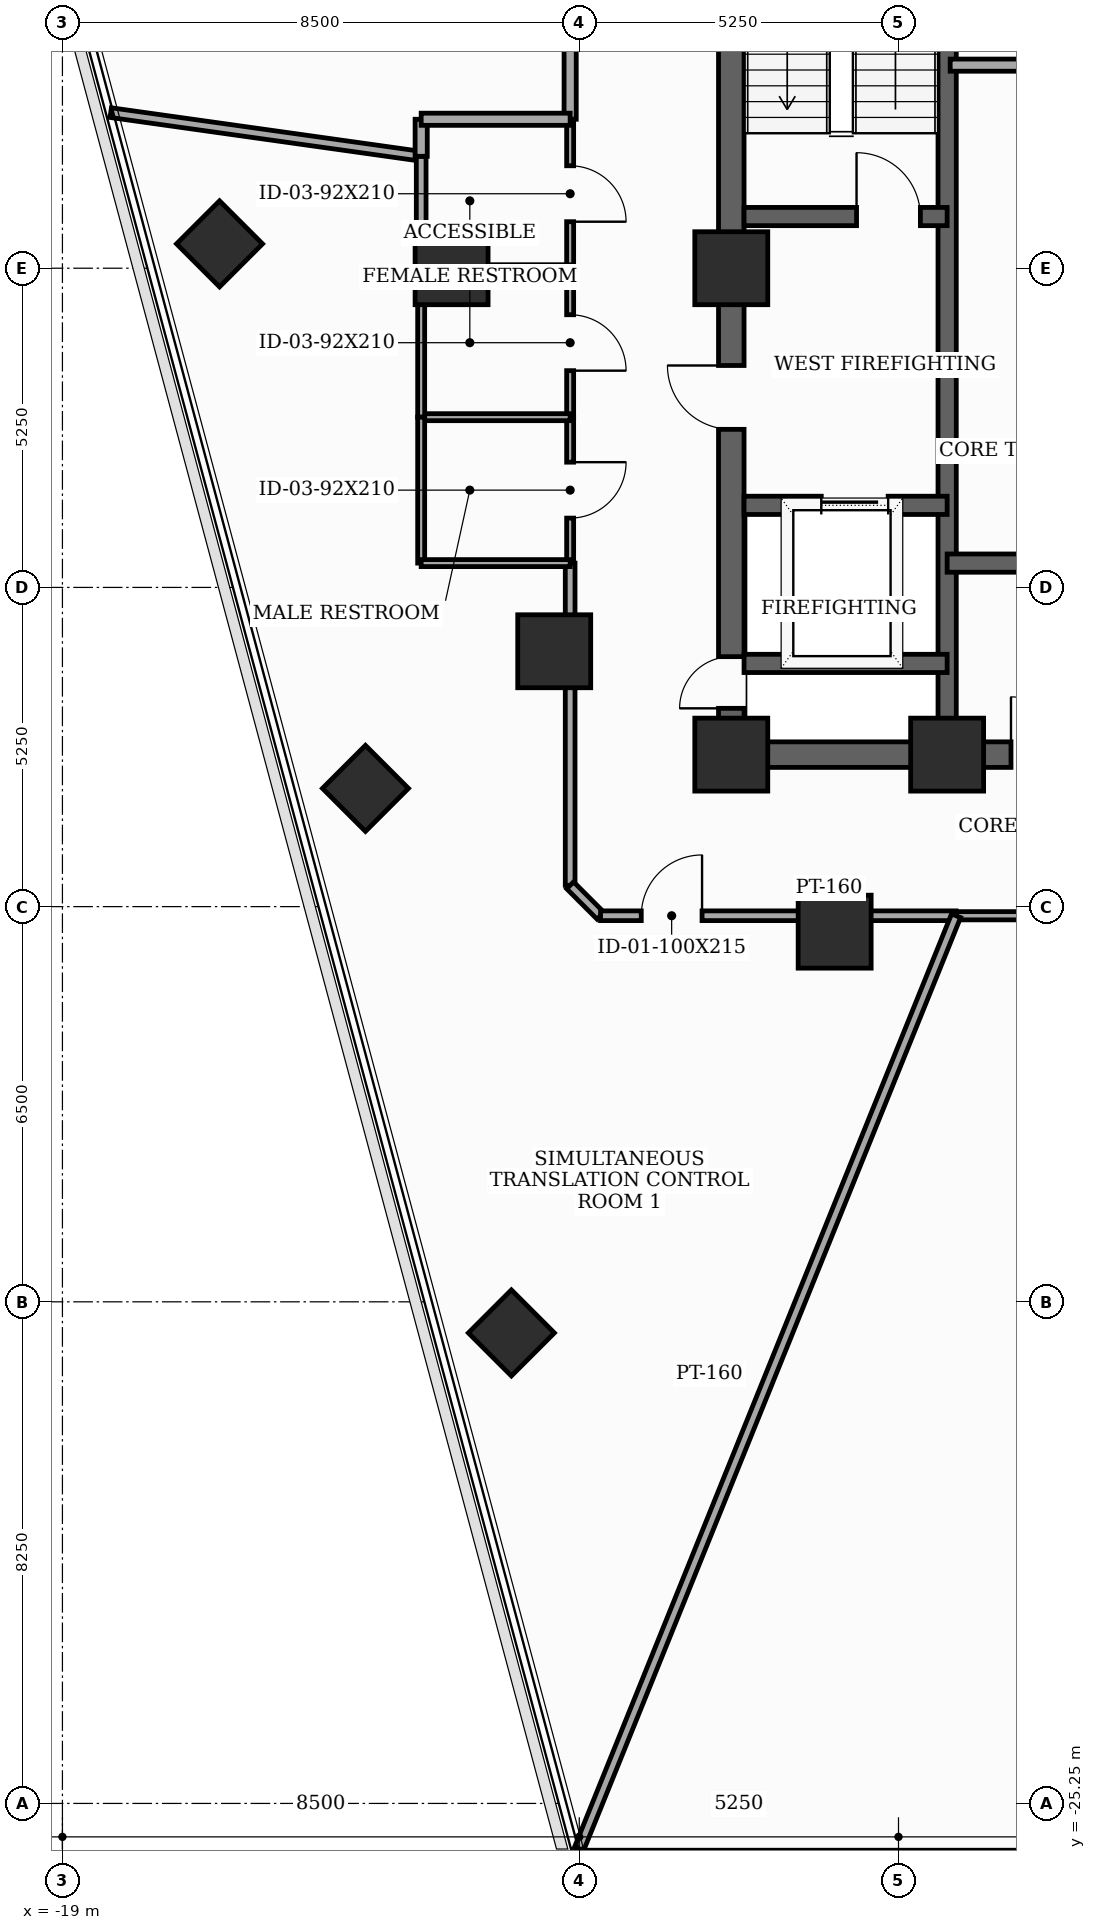
"""IFC4 building model, lengths in metres.
Left out: names, types, materials, properties, quantities, classifications, styles, units other than length and angle.
Written with IfcOpenShell. Run it as: python <this file> out.ifc"""

import sys

from ifc_helpers import new_model, si_unit, direction, frame, frame_2d, origin, origin_2d, place, context, subcontext, project, spatial, rectangle, extrude, element, fill, save


model = new_model("IFC4")
c1 = context("Model", 3, precision=1e-05, world=origin(), true_north=direction((0.0, 1.0)))
c2 = subcontext(c1, "Body", "Model", "MODEL_VIEW")
j1 = project(units=[si_unit("LENGTHUNIT", "METRE"), si_unit("PLANEANGLEUNIT", "RADIAN")], contexts=[c1])
p1 = place(None, origin())
s1 = spatial("IfcSite", under=j1, at=p1, CompositionType="ELEMENT")
p2 = place(p1, origin())
s2 = spatial("IfcBuilding", under=s1, at=p2, CompositionType="ELEMENT")
p3 = place(p2, frame((0.0, 0.0, 199.0)))
s3 = spatial("IfcBuildingStorey", under=s2, at=p3, CompositionType="ELEMENT", Elevation=199.0)
for number, where, z_axis, x_axis in (
    (1, (-8.0, -8.0, 0.0), (0.0, 0.0, 1.0), (1.0, 0.0, 0.0)),
    (2, (-4.45, -8.0, 0.0), (0.0, 0.0, 1.0), (1.0, 0.0, 0.0)),
    (3, (-8.0, 0.0, 0.0), (0.0, 0.0, 1.0), (1.0, 0.0, 0.0)),
    (4, (-12.6, 0.0, 0.0), (0.0, 0.0, 1.0), (1.0, 0.0, 0.0)),
    (5, (-10.912, -6.3, 0.0), (0.0, 0.0, 1.0), (1.0, 0.0, 0.0)),
    (6, (-6.3, -10.912, 0.0), (0.0, 0.0, 1.0), (1.0, 0.0, 0.0)),
):
    element("IfcColumn", number, at=place(p3, frame(where, z_axis=z_axis, x_axis=x_axis)), inside=s3, PredefinedType="COLUMN", context=c2, shape_type="SweptSolid", body=[
        extrude(rectangle(XDim=1.2, YDim=1.2, at=origin_2d()), origin(), (0.0, 0.0, 1.0), 3.7),
    ])
for number, where, z_axis, x_axis in (
    (7, (-16.416, 0.401, 0.0), (0.0, 0.0, 1.0), (0.707, 0.707, 0.0)),
    (8, (-14.016, -8.555, 0.0), (0.0, 0.0, 1.0), (0.707, 0.707, 0.0)),
    (9, (-11.616, -17.511, 0.0), (0.0, 0.0, 1.0), (0.707, 0.707, 0.0)),
):
    element("IfcColumn", number, at=place(p3, frame(where, z_axis=z_axis, x_axis=x_axis)), inside=s3, PredefinedType="COLUMN", context=c2, shape_type="SweptSolid", body=[
        extrude(rectangle(XDim=1.0, YDim=1.0, at=origin_2d()), origin(), (0.0, 0.0, 1.0), 3.7),
    ])
p4 = place(p3, frame((-8.0, -8.0, 0.0), z_axis=(0.0, 0.0, 1.0), x_axis=(0.0, 1.0, 0.0)))
e10 = element("IfcWall", 10, at=p4, inside=s3, PredefinedType="SHEAR", context=c2, shape_type="SweptSolid", body=[
    extrude(rectangle(XDim=16.0, YDim=0.42, at=frame_2d((8.0, 0.0))), origin(), (0.0, 0.0, 1.0), 3.5),
])
p5 = place(p4, frame((0.761, 0.0, 0.0)))
e11 = element("IfcOpeningElement", 11, at=p5, cuts=e10, PredefinedType="OPENING", context=c2, shape_type="SweptSolid", body=[
    extrude(rectangle(XDim=0.85, YDim=2.02, at=frame_2d((0.425, 1.01))), frame((0.0, 0.22, 0.0), z_axis=(0.0, -1.0, 0.0), x_axis=(1.0, 0.0, 0.0)), (0.0, 0.0, 1.0), 0.44),
])
p6 = place(p4, frame((5.35, 0.0, 0.0)))
e12 = element("IfcOpeningElement", 12, at=p6, cuts=e10, PredefinedType="OPENING", context=c2, shape_type="SweptSolid", body=[
    extrude(rectangle(XDim=1.05, YDim=2.15, at=frame_2d((0.525, 1.075))), frame((0.0, 0.22, 0.0), z_axis=(0.0, -1.0, 0.0), x_axis=(1.0, 0.0, 0.0)), (0.0, 0.0, 1.0), 0.44),
])
p7 = place(p3, frame((-8.0, -8.0, 0.0), z_axis=(0.0, 0.0, 1.0), x_axis=(1.0, 0.0, 0.0)))
e13 = element("IfcWall", 13, at=p7, inside=s3, PredefinedType="SHEAR", context=c2, shape_type="SweptSolid", body=[
    extrude(rectangle(XDim=16.0, YDim=0.42, at=frame_2d((8.0, 0.0))), origin(), (0.0, 0.0, 1.0), 3.5),
])
p8 = place(p7, frame((4.6, 0.0, 0.0)))
e14 = element("IfcOpeningElement", 14, at=p8, cuts=e13, PredefinedType="OPENING", context=c2, shape_type="SweptSolid", body=[
    extrude(rectangle(XDim=0.95, YDim=2.1, at=frame_2d((0.475, 1.05))), frame((0.0, 0.22, 0.0), z_axis=(0.0, -1.0, 0.0), x_axis=(1.0, 0.0, 0.0)), (0.0, 0.0, 1.0), 0.44),
])
p9 = place(p7, frame((7.52, 0.0, 0.0)))
e15 = element("IfcOpeningElement", 15, at=p9, cuts=e13, PredefinedType="OPENING", context=c2, shape_type="SweptSolid", body=[
    extrude(rectangle(XDim=0.95, YDim=2.1, at=frame_2d((0.475, 1.05))), frame((0.0, 0.22, 0.0), z_axis=(0.0, -1.0, 0.0), x_axis=(1.0, 0.0, 0.0)), (0.0, 0.0, 1.0), 0.44),
])
p10 = place(p7, frame((10.45, 0.0, 0.0)))
e16 = element("IfcOpeningElement", 16, at=p10, cuts=e13, PredefinedType="OPENING", context=c2, shape_type="SweptSolid", body=[
    extrude(rectangle(XDim=0.95, YDim=2.1, at=frame_2d((0.475, 1.05))), frame((0.0, 0.22, 0.0), z_axis=(0.0, -1.0, 0.0), x_axis=(1.0, 0.0, 0.0)), (0.0, 0.0, 1.0), 0.44),
])
p11 = place(p3, frame((-4.45, -7.79, 0.0), z_axis=(0.0, 0.0, 1.0), x_axis=(0.0, 1.0, 0.0)))
e17 = element("IfcWall", 17, at=p11, inside=s3, PredefinedType="SHEAR", context=c2, shape_type="SweptSolid", body=[
    extrude(rectangle(XDim=15.58, YDim=0.3, at=frame_2d((7.79, 0.0))), origin(), (0.0, 0.0, 1.0), 3.5),
])
p12 = place(p3, frame((-7.79, 0.85, 0.0), z_axis=(0.0, 0.0, 1.0), x_axis=(1.0, 0.0, 0.0)))
e18 = element("IfcWall", 18, at=p12, inside=s3, PredefinedType="SHEAR", context=c2, shape_type="SweptSolid", body=[
    extrude(rectangle(XDim=3.34, YDim=0.3, at=frame_2d((1.67, 0.0))), origin(), (0.0, 0.0, 1.0), 3.5),
])
p13 = place(p12, frame((1.85, 0.0, 0.0)))
e19 = element("IfcOpeningElement", 19, at=p13, cuts=e18, PredefinedType="OPENING", context=c2, shape_type="SweptSolid", body=[
    extrude(rectangle(XDim=1.05, YDim=2.15, at=frame_2d((0.525, 1.075))), frame((0.0, 0.16, 0.0), z_axis=(0.0, -1.0, 0.0), x_axis=(1.0, 0.0, 0.0)), (0.0, 0.0, 1.0), 0.32),
])
p14 = place(p3, frame((-7.79, -3.9, 0.0), z_axis=(0.0, 0.0, 1.0), x_axis=(1.0, 0.0, 0.0)))
e20 = element("IfcWall", 20, at=p14, inside=s3, PredefinedType="SHEAR", context=c2, shape_type="SweptSolid", body=[
    extrude(rectangle(XDim=3.34, YDim=0.3, at=frame_2d((1.67, 0.0))), origin(), (0.0, 0.0, 1.0), 3.5),
])
p15 = place(p14, frame((1.27, 0.0, 0.0)))
e21 = element("IfcOpeningElement", 21, at=p15, cuts=e20, PredefinedType="OPENING", context=c2, shape_type="SweptSolid", body=[
    extrude(rectangle(XDim=1.1, YDim=2.1, at=frame_2d((0.55, 1.05))), frame((0.0, 0.16, 0.0), z_axis=(0.0, -1.0, 0.0), x_axis=(1.0, 0.0, 0.0)), (0.0, 0.0, 1.0), 0.32),
])
p16 = place(p3, frame((-7.79, -6.5, 0.0), z_axis=(0.0, 0.0, 1.0), x_axis=(1.0, 0.0, 0.0)))
e22 = element("IfcWall", 22, at=p16, inside=s3, PredefinedType="SHEAR", context=c2, shape_type="SweptSolid", body=[
    extrude(rectangle(XDim=3.34, YDim=0.3, at=frame_2d((1.67, 0.0))), origin(), (0.0, 0.0, 1.0), 3.5),
])
p17 = place(p3, frame((-4.45, -4.85, 0.0), z_axis=(0.0, 0.0, 1.0), x_axis=(1.0, 0.0, 0.0)))
e23 = element("IfcWall", 23, at=p17, inside=s3, PredefinedType="SHEAR", context=c2, shape_type="SweptSolid", body=[
    extrude(rectangle(XDim=8.9, YDim=0.3, at=frame_2d((4.45, 0.0))), origin(), (0.0, 0.0, 1.0), 3.5),
])
p18 = place(p3, frame((-4.4, 3.34, 0.0), z_axis=(0.0, 0.0, 1.0), x_axis=(1.0, 0.0, 0.0)))
e24 = element("IfcWall", 24, at=p18, inside=s3, PredefinedType="SOLIDWALL", context=c2, shape_type="SweptSolid", body=[
    extrude(rectangle(XDim=2.68, YDim=0.2, at=frame_2d((1.34, 0.0))), origin(), (0.0, 0.0, 1.0), 3.5),
])
p19 = place(p3, frame((-10.65, 0.0, 0.0), z_axis=(0.0, 0.0, 1.0), x_axis=(0.0, -1.0, 0.0)))
e25 = element("IfcWall", 25, at=p19, inside=s3, PredefinedType="PARTITIONING", context=c2, shape_type="SweptSolid", body=[
    extrude(rectangle(XDim=2.45, YDim=0.115, at=frame_2d((1.225, 0.0))), origin(), (0.0, 0.0, 1.0), 2.885),
])
p20 = place(p19, frame((0.765, 0.0, 0.0)))
e26 = element("IfcOpeningElement", 26, at=p20, cuts=e25, PredefinedType="OPENING", context=c2, shape_type="SweptSolid", body=[
    extrude(rectangle(XDim=0.92, YDim=2.1, at=frame_2d((0.46, 1.05))), frame((0.0, 0.067, 0.0), z_axis=(0.0, -1.0, 0.0), x_axis=(1.0, 0.0, 0.0)), (0.0, 0.0, 1.0), 0.135),
])
p21 = place(p3, frame((-10.65, -2.45, 0.0), z_axis=(0.0, 0.0, 1.0), x_axis=(0.0, -1.0, 0.0)))
e27 = element("IfcWall", 27, at=p21, inside=s3, PredefinedType="PARTITIONING", context=c2, shape_type="SweptSolid", body=[
    extrude(rectangle(XDim=2.4, YDim=0.115, at=frame_2d((1.2, 0.0))), origin(), (0.0, 0.0, 1.0), 3.5),
])
p22 = place(p21, frame((0.74, 0.0, 0.0)))
e28 = element("IfcOpeningElement", 28, at=p22, cuts=e27, PredefinedType="OPENING", context=c2, shape_type="SweptSolid", body=[
    extrude(rectangle(XDim=0.92, YDim=2.1, at=frame_2d((0.46, 1.05))), frame((0.0, 0.067, 0.0), z_axis=(0.0, -1.0, 0.0), x_axis=(1.0, 0.0, 0.0)), (0.0, 0.0, 1.0), 0.135),
])
p23 = place(p3, frame((-10.65, -4.85, 0.0), z_axis=(0.0, 0.0, 1.0), x_axis=(0.0, -1.0, 0.0)))
e29 = element("IfcWall", 29, at=p23, inside=s3, PredefinedType="PARTITIONING", context=c2, shape_type="SweptSolid", body=[
    extrude(rectangle(XDim=5.3, YDim=0.16, at=frame_2d((2.65, 0.0))), origin(), (0.0, 0.0, 1.0), 2.885),
])
p24 = place(p3, frame((-10.65, -10.15, 0.0), z_axis=(0.0, 0.0, 1.0), x_axis=(0.707106781187, -0.707106781187, 0.0)))
e30 = element("IfcWall", 30, at=p24, inside=s3, PredefinedType="PARTITIONING", context=c2, shape_type="SweptSolid", body=[
    extrude(rectangle(XDim=0.707, YDim=0.16, at=frame_2d((0.354, 0.0))), origin(), (0.0, 0.0, 1.0), 3.5),
])
p25 = place(p3, frame((-10.15, -10.65, 0.0), z_axis=(0.0, 0.0, 1.0), x_axis=(1.0, 0.0, 0.0)))
e31 = element("IfcWall", 31, at=p25, inside=s3, PredefinedType="PARTITIONING", context=c2, shape_type="SweptSolid", body=[
    extrude(rectangle(XDim=5.847, YDim=0.16, at=frame_2d((2.923, 0.0))), origin(), (0.0, 0.0, 1.0), 2.885),
])
p26 = place(p25, frame((0.669, 0.0, 0.0)))
e32 = element("IfcOpeningElement", 32, at=p26, cuts=e31, PredefinedType="OPENING", context=c2, shape_type="SweptSolid", body=[
    extrude(rectangle(XDim=1.0, YDim=2.15, at=frame_2d((0.5, 1.075))), frame((0.0, 0.09, 0.0), z_axis=(0.0, -1.0, 0.0), x_axis=(1.0, 0.0, 0.0)), (0.0, 0.0, 1.0), 0.18),
])
p27 = place(p3, frame((-4.303, -10.65, 0.0), z_axis=(0.0, 0.0, 1.0), x_axis=(1.0, 0.0, 0.0)))
e33 = element("IfcWall", 33, at=p27, inside=s3, PredefinedType="PARTITIONING", context=c2, shape_type="SweptSolid", body=[
    extrude(rectangle(XDim=14.453, YDim=0.135, at=frame_2d((7.227, 0.0))), origin(), (0.0, 0.0, 1.0), 2.885),
])
p28 = place(p27, frame((6.751, 0.0, 0.0)))
e34 = element("IfcOpeningElement", 34, at=p28, cuts=e33, PredefinedType="OPENING", context=c2, shape_type="SweptSolid", body=[
    extrude(rectangle(XDim=0.95, YDim=2.1, at=frame_2d((0.475, 1.05))), frame((0.0, 0.077, 0.0), z_axis=(0.0, -1.0, 0.0), x_axis=(1.0, 0.0, 0.0)), (0.0, 0.0, 1.0), 0.155),
])
p29 = place(p3, frame((-10.65, 10.15, 0.0), z_axis=(0.0, 0.0, 1.0), x_axis=(0.0, -1.0, 0.0)))
e35 = element("IfcWall", 35, at=p29, inside=s3, PredefinedType="SOLIDWALL", context=c2, shape_type="SweptSolid", body=[
    extrude(rectangle(XDim=7.7, YDim=0.2, at=frame_2d((3.85, 0.0))), origin(), (0.0, 0.0, 1.0), 2.885),
])
p30 = place(p3, frame((-10.65, 2.45, 0.0), z_axis=(0.0, 0.0, 1.0), x_axis=(0.0, -1.0, 0.0)))
e36 = element("IfcWall", 36, at=p30, inside=s3, PredefinedType="PARTITIONING", context=c2, shape_type="SweptSolid", body=[
    extrude(rectangle(XDim=2.45, YDim=0.115, at=frame_2d((1.225, 0.0))), origin(), (0.0, 0.0, 1.0), 2.885),
])
p31 = place(p30, frame((0.765, 0.0, 0.0)))
e37 = element("IfcOpeningElement", 37, at=p31, cuts=e36, PredefinedType="OPENING", context=c2, shape_type="SweptSolid", body=[
    extrude(rectangle(XDim=0.92, YDim=2.1, at=frame_2d((0.46, 1.05))), frame((0.0, 0.067, 0.0), z_axis=(0.0, -1.0, 0.0), x_axis=(1.0, 0.0, 0.0)), (0.0, 0.0, 1.0), 0.135),
])
p32 = place(p3, frame((-13.1, -2.45, 0.0), z_axis=(0.0, 0.0, 1.0), x_axis=(1.0, 0.0, 0.0)))
e38 = element("IfcWall", 38, at=p32, inside=s3, PredefinedType="PARTITIONING", context=c2, shape_type="SweptSolid", body=[
    extrude(rectangle(XDim=2.45, YDim=0.115, at=frame_2d((1.225, 0.0))), origin(), (0.0, 0.0, 1.0), 2.885),
])
p33 = place(p3, frame((-13.1, 0.0, 0.0), z_axis=(0.0, 0.0, 1.0), x_axis=(0.0, -1.0, 0.0)))
e39 = element("IfcWall", 39, at=p33, inside=s3, PredefinedType="PARTITIONING", context=c2, shape_type="SweptSolid", body=[
    extrude(rectangle(XDim=2.45, YDim=0.115, at=frame_2d((1.225, 0.0))), origin(), (0.0, 0.0, 1.0), 2.985),
])
p34 = place(p3, frame((-10.65, 0.0, 0.0), z_axis=(0.0, 0.0, 1.0), x_axis=(-1.0, 0.0, 0.0)))
e40 = element("IfcWall", 40, at=p34, inside=s3, PredefinedType="PARTITIONING", context=c2, shape_type="SweptSolid", body=[
    extrude(rectangle(XDim=2.45, YDim=0.115, at=frame_2d((1.225, 0.0))), origin(), (0.0, 0.0, 1.0), 2.885),
])
p35 = place(p3, frame((-13.1, -2.45, 0.0), z_axis=(0.0, 0.0, 1.0), x_axis=(0.0, -1.0, 0.0)))
e41 = element("IfcWall", 41, at=p35, inside=s3, PredefinedType="PARTITIONING", context=c2, shape_type="SweptSolid", body=[
    extrude(rectangle(XDim=2.4, YDim=0.115, at=frame_2d((1.2, 0.0))), origin(), (0.0, 0.0, 1.0), 3.5),
])
p36 = place(p3, frame((-13.1, -4.85, 0.0), z_axis=(0.0, 0.0, 1.0), x_axis=(1.0, 0.0, 0.0)))
e42 = element("IfcWall", 42, at=p36, inside=s3, PredefinedType="PARTITIONING", context=c2, shape_type="SweptSolid", body=[
    extrude(rectangle(XDim=2.45, YDim=0.115, at=frame_2d((1.225, 0.0))), origin(), (0.0, 0.0, 1.0), 2.885),
])
p37 = place(p3, frame((-10.534, -26.073, 0.0), z_axis=(0.0, 0.0, 1.0), x_axis=(0.374584629334, 0.927192728329, 0.0)))
e43 = element("IfcWall", 43, at=p37, inside=s3, PredefinedType="PARTITIONING", context=c2, shape_type="SweptSolid", body=[
    extrude(rectangle(XDim=16.634, YDim=0.16, at=frame_2d((8.317, 0.0))), origin(), (0.0, 0.0, 1.0), 2.885),
])
p38 = place(p3, frame((-13.1, 1.841, 0.0), z_axis=(0.0, 0.0, 1.0), x_axis=(-0.990254946284, 0.139266440179, 0.0)))
e44 = element("IfcWall", 44, at=p38, inside=s3, PredefinedType="PARTITIONING", context=c2, shape_type="SweptSolid", body=[
    extrude(rectangle(XDim=5.156, YDim=0.16, at=frame_2d((2.578, 0.0))), origin(), (0.0, 0.0, 1.0), 2.985),
])
p39 = place(p3, frame((-13.1, 0.0, 0.0), z_axis=(0.0, 0.0, 1.0), x_axis=(0.0, 1.0, 0.0)))
e45 = element("IfcWall", 45, at=p39, inside=s3, PredefinedType="PARTITIONING", context=c2, shape_type="SweptSolid", body=[
    extrude(rectangle(XDim=1.841, YDim=0.16, at=frame_2d((0.92, 0.0))), origin(), (0.0, 0.0, 1.0), 2.985),
])
p40 = place(p3, frame((-13.1, 1.841, 0.0), z_axis=(0.0, 0.0, 1.0), x_axis=(0.0, 1.0, 0.0)))
e46 = element("IfcWall", 46, at=p40, inside=s3, PredefinedType="SOLIDWALL", context=c2, shape_type="SweptSolid", body=[
    extrude(rectangle(XDim=0.609, YDim=0.2, at=frame_2d((0.304, 0.0))), origin(), (0.0, 0.0, 1.0), 3.5),
])
p41 = place(p3, frame((-13.1, 2.45, 0.0), z_axis=(0.0, 0.0, 1.0), x_axis=(1.0, 0.0, 0.0)))
e47 = element("IfcWall", 47, at=p41, inside=s3, PredefinedType="SOLIDWALL", context=c2, shape_type="SweptSolid", body=[
    extrude(rectangle(XDim=2.45, YDim=0.2, at=frame_2d((1.225, 0.0))), origin(), (0.0, 0.0, 1.0), 2.885),
])
p42 = place(p5, origin())
e48 = element("IfcDoor", 48, at=p42, inside=s3, OperationType="SINGLE_SWING_LEFT", PredefinedType="TRAPDOOR", context=c2, shape_type="SweptSolid", body=[
    extrude(rectangle(XDim=0.85, YDim=2.02, at=frame_2d((0.425, 1.01))), frame((0.0, 0.025, 0.0), z_axis=(0.0, -1.0, 0.0), x_axis=(1.0, 0.0, 0.0)), (0.0, 0.0, 1.0), 0.05),
])
fill(e11, e48)
p43 = place(p6, origin())
e49 = element("IfcDoor", 49, at=p43, inside=s3, OperationType="SINGLE_SWING_RIGHT", PredefinedType="DOOR", context=c2, shape_type="SweptSolid", body=[
    extrude(rectangle(XDim=1.05, YDim=2.15, at=frame_2d((0.525, 1.075))), frame((0.0, 0.025, 0.0), z_axis=(0.0, -1.0, 0.0), x_axis=(1.0, 0.0, 0.0)), (0.0, 0.0, 1.0), 0.05),
])
fill(e12, e49)
p44 = place(p8, origin())
e50 = element("IfcDoor", 50, at=p44, inside=s3, OperationType="SINGLE_SWING_LEFT", PredefinedType="DOOR", context=c2, shape_type="SweptSolid", body=[
    extrude(rectangle(XDim=0.95, YDim=2.1, at=frame_2d((0.475, 1.05))), frame((0.0, 0.025, 0.0), z_axis=(0.0, -1.0, 0.0), x_axis=(1.0, 0.0, 0.0)), (0.0, 0.0, 1.0), 0.05),
])
fill(e14, e50)
p45 = place(p13, origin())
e51 = element("IfcDoor", 51, at=p45, inside=s3, OperationType="SINGLE_SWING_LEFT", PredefinedType="DOOR", context=c2, shape_type="SweptSolid", body=[
    extrude(rectangle(XDim=1.05, YDim=2.15, at=frame_2d((0.525, 1.075))), frame((0.0, 0.025, 0.0), z_axis=(0.0, -1.0, 0.0), x_axis=(1.0, 0.0, 0.0)), (0.0, 0.0, 1.0), 0.05),
])
fill(e19, e51)
p46 = place(p15, origin())
e52 = element("IfcDoor", 52, at=p46, inside=s3, OperationType="SLIDING_TO_LEFT", PredefinedType="DOOR", context=c2, shape_type="SweptSolid", body=[
    extrude(rectangle(XDim=1.1, YDim=2.1, at=frame_2d((0.55, 1.05))), frame((0.0, 0.025, 0.0), z_axis=(0.0, -1.0, 0.0), x_axis=(1.0, 0.0, 0.0)), (0.0, 0.0, 1.0), 0.05),
])
fill(e21, e52)
p47 = place(p20, origin())
e53 = element("IfcDoor", 53, at=p47, inside=s3, OperationType="SINGLE_SWING_RIGHT", PredefinedType="DOOR", context=c2, shape_type="SweptSolid", body=[
    extrude(rectangle(XDim=0.92, YDim=2.1, at=frame_2d((0.46, 1.05))), frame((0.0, 0.025, 0.0), z_axis=(0.0, -1.0, 0.0), x_axis=(1.0, 0.0, 0.0)), (0.0, 0.0, 1.0), 0.05),
])
fill(e26, e53)
p48 = place(p22, origin())
e54 = element("IfcDoor", 54, at=p48, inside=s3, OperationType="SINGLE_SWING_LEFT", PredefinedType="DOOR", context=c2, shape_type="SweptSolid", body=[
    extrude(rectangle(XDim=0.92, YDim=2.1, at=frame_2d((0.46, 1.05))), frame((0.0, 0.025, 0.0), z_axis=(0.0, -1.0, 0.0), x_axis=(1.0, 0.0, 0.0)), (0.0, 0.0, 1.0), 0.05),
])
fill(e28, e54)
p49 = place(p26, origin())
e55 = element("IfcDoor", 55, at=p49, inside=s3, OperationType="SINGLE_SWING_RIGHT", PredefinedType="DOOR", context=c2, shape_type="SweptSolid", body=[
    extrude(rectangle(XDim=1.0, YDim=2.15, at=frame_2d((0.5, 1.075))), frame((0.0, 0.025, 0.0), z_axis=(0.0, -1.0, 0.0), x_axis=(1.0, 0.0, 0.0)), (0.0, 0.0, 1.0), 0.05),
])
fill(e32, e55)
p50 = place(p31, origin())
e56 = element("IfcDoor", 56, at=p50, inside=s3, OperationType="SINGLE_SWING_RIGHT", PredefinedType="DOOR", context=c2, shape_type="SweptSolid", body=[
    extrude(rectangle(XDim=0.92, YDim=2.1, at=frame_2d((0.46, 1.05))), frame((0.0, 0.025, 0.0), z_axis=(0.0, -1.0, 0.0), x_axis=(1.0, 0.0, 0.0)), (0.0, 0.0, 1.0), 0.05),
])
fill(e37, e56)
save(model, sys.argv[1])
